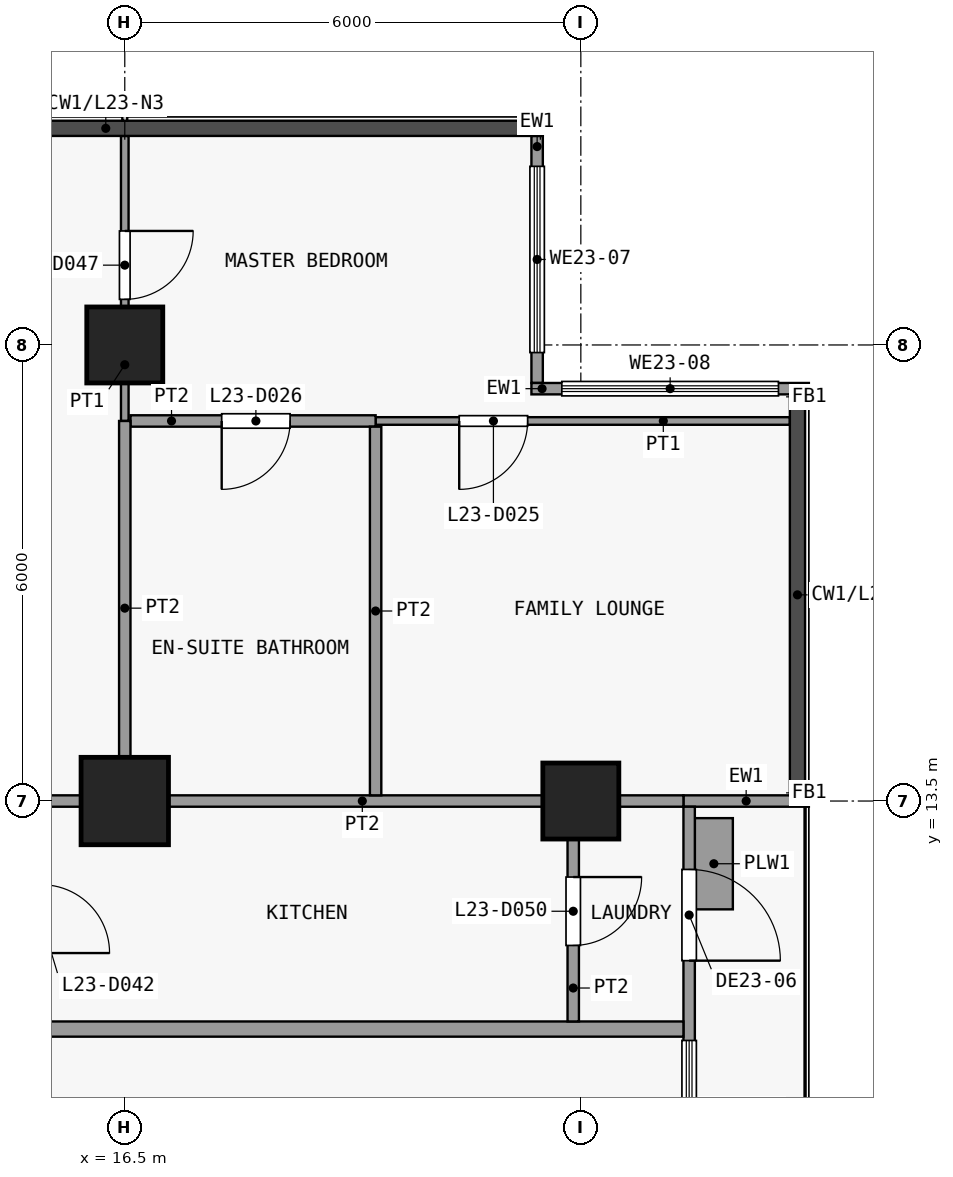
"""IFC4 building model, lengths in metres.
Left out: names, types, materials, properties, quantities, classifications, styles, units other than length and angle.
Written with IfcOpenShell. Run it as: python <this file> out.ifc"""

import sys

from ifc_helpers import new_model, si_unit, direction, frame, frame_2d, origin, origin_2d, place, context, subcontext, project, spatial, rectangle, extrude, element, fill, save


model = new_model("IFC4")
c1 = context("Model", 3, precision=1e-05, world=origin(), true_north=direction((0.0, 1.0)))
c2 = subcontext(c1, "Body", "Model", "MODEL_VIEW")
j1 = project(units=[si_unit("LENGTHUNIT", "METRE"), si_unit("PLANEANGLEUNIT", "RADIAN")], contexts=[c1])
p1 = place(None, origin())
s1 = spatial("IfcSite", under=j1, at=p1, CompositionType="ELEMENT")
p2 = place(p1, origin())
s2 = spatial("IfcBuilding", under=s1, at=p2, CompositionType="ELEMENT")
p3 = place(p2, frame((0.0, 0.0, 95.5)))
s3 = spatial("IfcBuildingStorey", under=s2, at=p3, CompositionType="ELEMENT", Elevation=95.5)
p4 = place(p3, frame((16.5, 13.5, 0.0), z_axis=(0.0, 0.0, 1.0), x_axis=(1.0, 0.0, 0.0)))
e1 = element("IfcColumn", 1, at=p4, inside=s3, PredefinedType="COLUMN", context=c2, shape_type="SweptSolid", body=[
    extrude(rectangle(XDim=1.15, YDim=1.15, at=origin_2d()), origin(), (0.0, 0.0, 1.0), 3.6),
])
for number, where, z_axis, x_axis in (
    (2, (16.5, 19.5, 0.0), (0.0, 0.0, 1.0), (1.0, 0.0, 0.0)),
    (3, (22.5, 13.5, 0.0), (0.0, 0.0, 1.0), (1.0, 0.0, 0.0)),
):
    element("IfcColumn", number, at=place(p3, frame(where, z_axis=z_axis, x_axis=x_axis)), inside=s3, PredefinedType="COLUMN", context=c2, shape_type="SweptSolid", body=[
        extrude(rectangle(XDim=1.0, YDim=1.0, at=origin_2d()), origin(), (0.0, 0.0, 1.0), 3.6),
    ])
p5 = place(p3, frame((21.925, 22.25, 0.0), z_axis=(0.0, 0.0, 1.0), x_axis=(0.0, -1.0, 0.0)))
e4 = element("IfcWall", 4, at=p5, inside=s3, PredefinedType="SOLIDWALL", context=c2, shape_type="SweptSolid", body=[
    extrude(rectangle(XDim=3.25, YDim=0.15, at=frame_2d((1.625, 0.0))), origin(), (0.0, 0.0, 1.0), 3.3),
])
p6 = place(p5, frame((0.4, 0.0, 0.9)))
e5 = element("IfcOpeningElement", 5, at=p6, cuts=e4, PredefinedType="OPENING", context=c2, shape_type="SweptSolid", body=[
    extrude(rectangle(XDim=2.45, YDim=2.4, at=frame_2d((1.225, 1.2))), frame((0.0, 0.085, 0.0), z_axis=(0.0, -1.0, 0.0), x_axis=(1.0, 0.0, 0.0)), (0.0, 0.0, 1.0), 0.17),
])
p7 = place(p3, frame((21.85, 18.925, 0.0), z_axis=(0.0, 0.0, 1.0), x_axis=(1.0, 0.0, 0.0)))
e6 = element("IfcWall", 6, at=p7, inside=s3, PredefinedType="SOLIDWALL", context=c2, shape_type="SweptSolid", body=[
    extrude(rectangle(XDim=3.65, YDim=0.15, at=frame_2d((1.825, 0.0))), origin(), (0.0, 0.0, 1.0), 3.3),
])
p8 = place(p7, frame((0.4, 0.0, 0.9)))
e7 = element("IfcOpeningElement", 7, at=p8, cuts=e6, PredefinedType="OPENING", context=c2, shape_type="SweptSolid", body=[
    extrude(rectangle(XDim=2.85, YDim=2.4, at=frame_2d((1.425, 1.2))), frame((0.0, 0.085, 0.0), z_axis=(0.0, -1.0, 0.0), x_axis=(1.0, 0.0, 0.0)), (0.0, 0.0, 1.0), 0.17),
])
p9 = place(p3, frame((23.85, 13.5, 0.0), z_axis=(0.0, 0.0, 1.0), x_axis=(1.0, 0.0, 0.0)))
e8 = element("IfcWall", 8, at=p9, inside=s3, PredefinedType="SOLIDWALL", context=c2, shape_type="SweptSolid", body=[
    extrude(rectangle(XDim=1.65, YDim=0.15, at=frame_2d((0.825, 0.0))), origin(), (0.0, 0.0, 1.0), 3.3),
])
p10 = place(p3, frame((23.925, 13.425, 0.0), z_axis=(0.0, 0.0, 1.0), x_axis=(0.0, -1.0, 0.0)))
e9 = element("IfcWall", 9, at=p10, inside=s3, PredefinedType="SOLIDWALL", context=c2, shape_type="SweptSolid", body=[
    extrude(rectangle(XDim=5.925, YDim=0.15, at=frame_2d((2.962, 0.0))), origin(), (0.0, 0.0, 1.0), 3.3),
])
p11 = place(p10, frame((0.825, 0.0, 0.0)))
e10 = element("IfcOpeningElement", 10, at=p11, cuts=e9, PredefinedType="OPENING", context=c2, shape_type="SweptSolid", body=[
    extrude(rectangle(XDim=1.2, YDim=2.4, at=frame_2d((0.6, 1.2))), frame((0.0, 0.085, 0.0), z_axis=(0.0, -1.0, 0.0), x_axis=(1.0, 0.0, 0.0)), (0.0, 0.0, 1.0), 0.17),
])
p12 = place(p10, frame((3.075, 0.0, 0.9)))
e11 = element("IfcOpeningElement", 11, at=p12, cuts=e9, PredefinedType="OPENING", context=c2, shape_type="SweptSolid", body=[
    extrude(rectangle(XDim=1.8, YDim=2.1, at=frame_2d((0.9, 1.05))), frame((0.0, 0.085, 0.0), z_axis=(0.0, -1.0, 0.0), x_axis=(1.0, 0.0, 0.0)), (0.0, 0.0, 1.0), 0.17),
])
p13 = place(p3, frame((24.25, 12.075, 0.0), z_axis=(0.0, 0.0, 1.0), x_axis=(0.0, 1.0, 0.0)))
e12 = element("IfcWall", 12, at=p13, inside=s3, PredefinedType="USERDEFINED", context=c2, shape_type="SweptSolid", body=[
    extrude(rectangle(XDim=1.2, YDim=0.5, at=frame_2d((0.6, 0.0))), origin(), (0.0, 0.0, 1.0), 0.9),
])
p14 = place(p3, frame((-23.85, 10.5, 0.0), z_axis=(0.0, 0.0, 1.0), x_axis=(1.0, 0.0, 0.0)))
e13 = element("IfcWall", 13, at=p14, inside=s3, PredefinedType="PARTITIONING", context=c2, shape_type="SweptSolid", body=[
    extrude(rectangle(XDim=47.7, YDim=0.2, at=frame_2d((23.85, 0.0))), origin(), (0.0, 0.0, 1.0), 3.3),
])
p15 = place(p14, frame((3.05, 0.0, 0.0)))
e14 = element("IfcOpeningElement", 14, at=p15, cuts=e13, PredefinedType="OPENING", context=c2, shape_type="SweptSolid", body=[
    extrude(rectangle(XDim=1.0, YDim=2.1, at=frame_2d((0.5, 1.05))), frame((0.0, 0.11, 0.0), z_axis=(0.0, -1.0, 0.0), x_axis=(1.0, 0.0, 0.0)), (0.0, 0.0, 1.0), 0.22),
])
p16 = place(p14, frame((11.55, 0.0, 0.0)))
e15 = element("IfcOpeningElement", 15, at=p16, cuts=e13, PredefinedType="OPENING", context=c2, shape_type="SweptSolid", body=[
    extrude(rectangle(XDim=1.0, YDim=2.1, at=frame_2d((0.5, 1.05))), frame((0.0, 0.11, 0.0), z_axis=(0.0, -1.0, 0.0), x_axis=(1.0, 0.0, 0.0)), (0.0, 0.0, 1.0), 0.22),
])
p17 = place(p14, frame((37.55, 0.0, 0.0)))
e16 = element("IfcOpeningElement", 16, at=p17, cuts=e13, PredefinedType="OPENING", context=c2, shape_type="SweptSolid", body=[
    extrude(rectangle(XDim=1.0, YDim=2.1, at=frame_2d((0.5, 1.05))), frame((0.0, 0.11, 0.0), z_axis=(0.0, -1.0, 0.0), x_axis=(1.0, 0.0, 0.0)), (0.0, 0.0, 1.0), 0.22),
])
p18 = place(p3, frame((15.4, 13.5, 0.0), z_axis=(0.0, 0.0, 1.0), x_axis=(1.0, 0.0, 0.0)))
e17 = element("IfcWall", 17, at=p18, inside=s3, PredefinedType="PARTITIONING", context=c2, shape_type="SweptSolid", body=[
    extrude(rectangle(XDim=8.45, YDim=0.15, at=frame_2d((4.225, 0.0))), origin(), (0.0, 0.0, 1.0), 3.3),
])
p19 = place(p3, frame((19.8, 18.5, 0.0), z_axis=(0.0, 0.0, 1.0), x_axis=(1.0, 0.0, 0.0)))
e18 = element("IfcWall", 18, at=p19, inside=s3, PredefinedType="PARTITIONING", context=c2, shape_type="SweptSolid", body=[
    extrude(rectangle(XDim=5.45, YDim=0.1, at=frame_2d((2.725, 0.0))), origin(), (0.0, 0.0, 1.0), 3.3),
])
p20 = place(p19, frame((1.1, 0.0, 0.0)))
e19 = element("IfcOpeningElement", 19, at=p20, cuts=e18, PredefinedType="OPENING", context=c2, shape_type="SweptSolid", body=[
    extrude(rectangle(XDim=0.9, YDim=2.1, at=frame_2d((0.45, 1.05))), frame((0.0, 0.06, 0.0), z_axis=(0.0, -1.0, 0.0), x_axis=(1.0, 0.0, 0.0)), (0.0, 0.0, 1.0), 0.12),
])
p21 = place(p3, frame((16.575, 18.5, 0.0), z_axis=(0.0, 0.0, 1.0), x_axis=(1.0, 0.0, 0.0)))
e20 = element("IfcWall", 20, at=p21, inside=s3, PredefinedType="PARTITIONING", context=c2, shape_type="SweptSolid", body=[
    extrude(rectangle(XDim=3.225, YDim=0.15, at=frame_2d((1.613, 0.0))), origin(), (0.0, 0.0, 1.0), 3.3),
])
p22 = place(p21, frame((1.2, 0.0, 0.0)))
e21 = element("IfcOpeningElement", 21, at=p22, cuts=e20, PredefinedType="OPENING", context=c2, shape_type="SweptSolid", body=[
    extrude(rectangle(XDim=0.9, YDim=2.1, at=frame_2d((0.45, 1.05))), frame((0.0, 0.085, 0.0), z_axis=(0.0, -1.0, 0.0), x_axis=(1.0, 0.0, 0.0)), (0.0, 0.0, 1.0), 0.17),
])
p23 = place(p3, frame((16.5, 18.5, 0.0), z_axis=(0.0, 0.0, 1.0), x_axis=(0.0, 1.0, 0.0)))
e22 = element("IfcWall", 22, at=p23, inside=s3, PredefinedType="PARTITIONING", context=c2, shape_type="SweptSolid", body=[
    extrude(rectangle(XDim=3.75, YDim=0.1, at=frame_2d((1.875, 0.0))), origin(), (0.0, 0.0, 1.0), 3.3),
])
p24 = place(p23, frame((1.6, 0.0, 0.0)))
e23 = element("IfcOpeningElement", 23, at=p24, cuts=e22, PredefinedType="OPENING", context=c2, shape_type="SweptSolid", body=[
    extrude(rectangle(XDim=0.9, YDim=2.1, at=frame_2d((0.45, 1.05))), frame((0.0, 0.06, 0.0), z_axis=(0.0, -1.0, 0.0), x_axis=(1.0, 0.0, 0.0)), (0.0, 0.0, 1.0), 0.12),
])
p25 = place(p3, frame((16.5, 13.575, 0.0), z_axis=(0.0, 0.0, 1.0), x_axis=(0.0, 1.0, 0.0)))
e24 = element("IfcWall", 24, at=p25, inside=s3, PredefinedType="PARTITIONING", context=c2, shape_type="SweptSolid", body=[
    extrude(rectangle(XDim=4.925, YDim=0.15, at=frame_2d((2.462, 0.0))), origin(), (0.0, 0.0, 1.0), 3.3),
])
p26 = place(p3, frame((19.8, 13.575, 0.0), z_axis=(0.0, 0.0, 1.0), x_axis=(0.0, 1.0, 0.0)))
e25 = element("IfcWall", 25, at=p26, inside=s3, PredefinedType="PARTITIONING", context=c2, shape_type="SweptSolid", body=[
    extrude(rectangle(XDim=4.85, YDim=0.15, at=frame_2d((2.425, 0.0))), origin(), (0.0, 0.0, 1.0), 3.3),
])
p27 = place(p3, frame((22.4, 10.6, 0.0), z_axis=(0.0, 0.0, 1.0), x_axis=(0.0, 1.0, 0.0)))
e26 = element("IfcWall", 26, at=p27, inside=s3, PredefinedType="PARTITIONING", context=c2, shape_type="SweptSolid", body=[
    extrude(rectangle(XDim=2.825, YDim=0.15, at=frame_2d((1.413, 0.0))), origin(), (0.0, 0.0, 1.0), 3.3),
])
p28 = place(p27, frame((1.0, 0.0, 0.0)))
e27 = element("IfcOpeningElement", 27, at=p28, cuts=e26, PredefinedType="OPENING", context=c2, shape_type="SweptSolid", body=[
    extrude(rectangle(XDim=0.9, YDim=2.1, at=frame_2d((0.45, 1.05))), frame((0.0, 0.085, 0.0), z_axis=(0.0, -1.0, 0.0), x_axis=(1.0, 0.0, 0.0)), (0.0, 0.0, 1.0), 0.17),
])
p29 = place(p6, origin())
e28 = element("IfcWindow", 28, at=p29, inside=s3, PartitioningType="SINGLE_PANEL", PredefinedType="WINDOW", context=c2, shape_type="SweptSolid", body=[
    extrude(rectangle(XDim=2.45, YDim=2.4, at=frame_2d((1.225, 1.2))), frame((0.0, 0.03, 0.0), z_axis=(0.0, -1.0, 0.0), x_axis=(1.0, 0.0, 0.0)), (0.0, 0.0, 1.0), 0.06),
])
fill(e5, e28)
p30 = place(p8, origin())
e29 = element("IfcWindow", 29, at=p30, inside=s3, PartitioningType="SINGLE_PANEL", PredefinedType="WINDOW", context=c2, shape_type="SweptSolid", body=[
    extrude(rectangle(XDim=2.85, YDim=2.4, at=frame_2d((1.425, 1.2))), frame((0.0, 0.03, 0.0), z_axis=(0.0, -1.0, 0.0), x_axis=(1.0, 0.0, 0.0)), (0.0, 0.0, 1.0), 0.06),
])
fill(e7, e29)
p31 = place(p11, origin())
e30 = element("IfcDoor", 30, at=p31, inside=s3, OperationType="SINGLE_SWING_RIGHT", PredefinedType="DOOR", context=c2, shape_type="SweptSolid", body=[
    extrude(rectangle(XDim=1.2, YDim=2.4, at=frame_2d((0.6, 1.2))), frame((0.0, 0.025, 0.0), z_axis=(0.0, -1.0, 0.0), x_axis=(1.0, 0.0, 0.0)), (0.0, 0.0, 1.0), 0.05),
])
fill(e10, e30)
p32 = place(p12, origin())
e31 = element("IfcWindow", 31, at=p32, inside=s3, PartitioningType="SINGLE_PANEL", PredefinedType="WINDOW", context=c2, shape_type="SweptSolid", body=[
    extrude(rectangle(XDim=1.8, YDim=2.1, at=frame_2d((0.9, 1.05))), frame((0.0, 0.03, 0.0), z_axis=(0.0, -1.0, 0.0), x_axis=(1.0, 0.0, 0.0)), (0.0, 0.0, 1.0), 0.06),
])
fill(e11, e31)
p33 = place(p20, origin())
e32 = element("IfcDoor", 32, at=p33, inside=s3, OperationType="SINGLE_SWING_LEFT", PredefinedType="DOOR", context=c2, shape_type="SweptSolid", body=[
    extrude(rectangle(XDim=0.9, YDim=2.1, at=frame_2d((0.45, 1.05))), frame((0.0, 0.025, 0.0), z_axis=(0.0, -1.0, 0.0), x_axis=(1.0, 0.0, 0.0)), (0.0, 0.0, 1.0), 0.05),
])
fill(e19, e32)
p34 = place(p22, origin())
e33 = element("IfcDoor", 33, at=p34, inside=s3, OperationType="SINGLE_SWING_LEFT", PredefinedType="DOOR", context=c2, shape_type="SweptSolid", body=[
    extrude(rectangle(XDim=0.9, YDim=2.1, at=frame_2d((0.45, 1.05))), frame((0.0, 0.025, 0.0), z_axis=(0.0, -1.0, 0.0), x_axis=(1.0, 0.0, 0.0)), (0.0, 0.0, 1.0), 0.05),
])
fill(e21, e33)
p35 = place(p24, origin())
e34 = element("IfcDoor", 34, at=p35, inside=s3, OperationType="SINGLE_SWING_RIGHT", PredefinedType="DOOR", context=c2, shape_type="SweptSolid", body=[
    extrude(rectangle(XDim=0.9, YDim=2.1, at=frame_2d((0.45, 1.05))), frame((0.0, 0.025, 0.0), z_axis=(0.0, -1.0, 0.0), x_axis=(1.0, 0.0, 0.0)), (0.0, 0.0, 1.0), 0.05),
])
fill(e23, e34)
p36 = place(p28, origin())
e35 = element("IfcDoor", 35, at=p36, inside=s3, OperationType="SINGLE_SWING_RIGHT", PredefinedType="DOOR", context=c2, shape_type="SweptSolid", body=[
    extrude(rectangle(XDim=0.9, YDim=2.1, at=frame_2d((0.45, 1.05))), frame((0.0, 0.025, 0.0), z_axis=(0.0, -1.0, 0.0), x_axis=(1.0, 0.0, 0.0)), (0.0, 0.0, 1.0), 0.05),
])
fill(e27, e35)
save(model, sys.argv[1])
